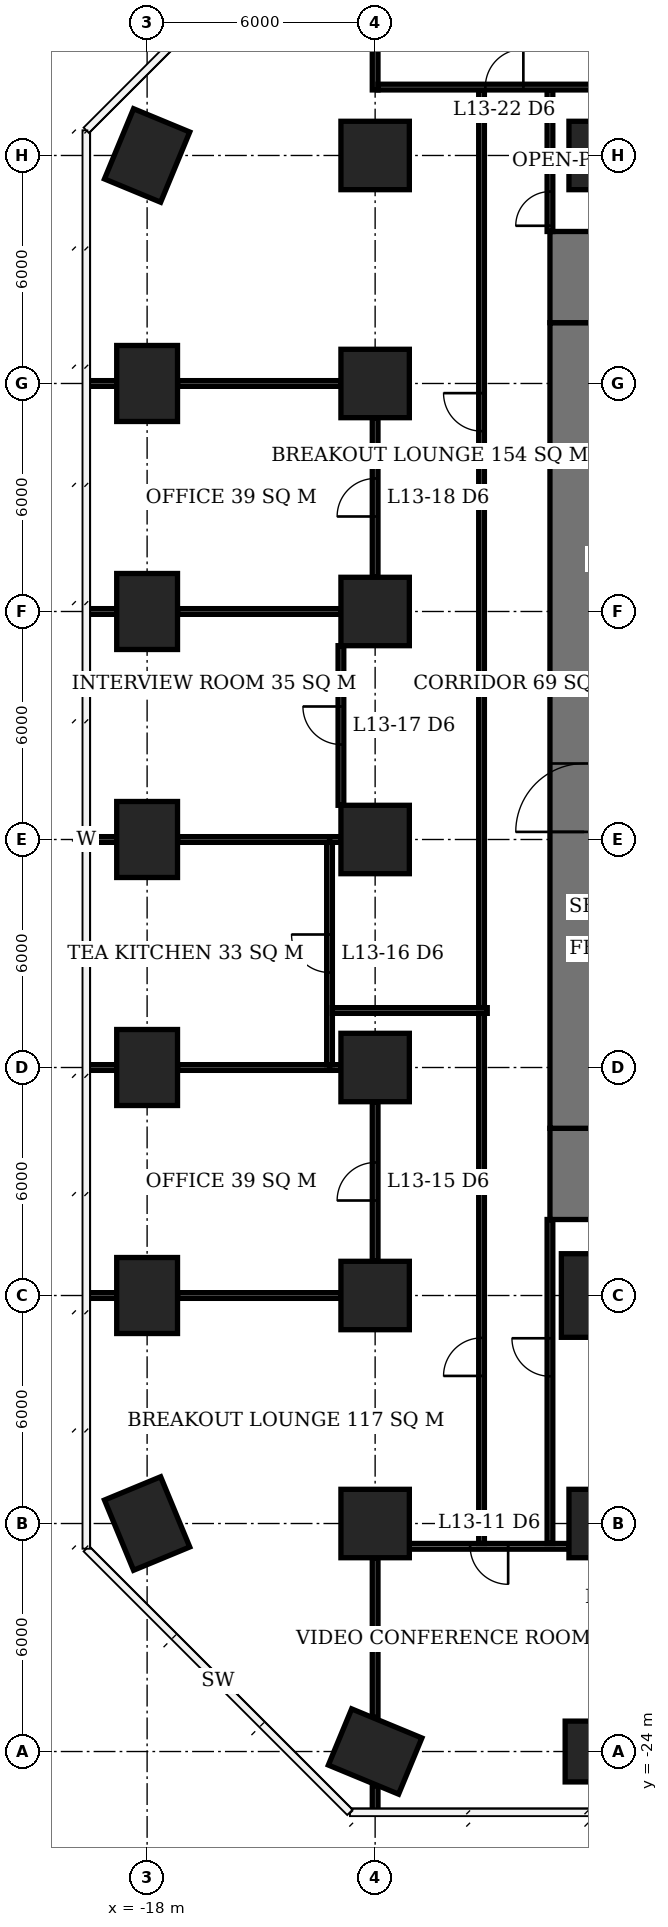
"""IFC4 building model, lengths in metres.
Left out: names, types, materials, properties, quantities, classifications, styles, units other than length and angle.
Written with IfcOpenShell. Run it as: python <this file> out.ifc"""

import sys

from ifc_helpers import new_model, si_unit, direction, frame, frame_2d, origin, origin_2d, place, context, subcontext, project, spatial, rectangle, extrude, element, fill, save


model = new_model("IFC4")
c1 = context("Model", 3, precision=1e-05, world=origin(), true_north=direction((0.0, 1.0)))
c2 = subcontext(c1, "Body", "Model", "MODEL_VIEW")
j1 = project(units=[si_unit("LENGTHUNIT", "METRE"), si_unit("PLANEANGLEUNIT", "RADIAN")], contexts=[c1])
p1 = place(None, origin())
s1 = spatial("IfcSite", under=j1, at=p1, CompositionType="ELEMENT")
p2 = place(p1, origin())
s2 = spatial("IfcBuilding", under=s1, at=p2, CompositionType="ELEMENT")
p3 = place(p2, frame((0.0, 0.0, 57.2)))
s3 = spatial("IfcBuildingStorey", under=s2, at=p3, CompositionType="ELEMENT", Elevation=57.2)
for number, where, z_axis, x_axis in (
    (1, (-18.0, -18.0, 0.0), (0.0, 0.0, 1.0), (-0.383, 0.924, 0.0)),
    (2, (-18.0, -12.0, 0.0), (0.0, 0.0, 1.0), (0.0, 1.0, 0.0)),
    (3, (-18.0, -6.0, 0.0), (0.0, 0.0, 1.0), (0.0, 1.0, 0.0)),
    (4, (-18.0, 0.0, 0.0), (0.0, 0.0, 1.0), (0.0, 1.0, 0.0)),
    (5, (-18.0, 6.0, 0.0), (0.0, 0.0, 1.0), (0.0, 1.0, 0.0)),
    (6, (-18.0, 12.0, 0.0), (0.0, 0.0, 1.0), (0.0, 1.0, 0.0)),
    (7, (-18.0, 18.0, 0.0), (0.0, 0.0, 1.0), (0.383, 0.924, 0.0)),
    (8, (-12.0, -24.0, 0.0), (0.0, 0.0, 1.0), (-0.924, 0.383, 0.0)),
):
    element("IfcColumn", number, at=place(p3, frame(where, z_axis=z_axis, x_axis=x_axis)), inside=s3, PredefinedType="COLUMN", context=c2, shape_type="SweptSolid", body=[
        extrude(rectangle(XDim=2.0, YDim=1.6, at=origin_2d()), origin(), (0.0, 0.0, 1.0), 3.9),
    ])
for number, where, z_axis, x_axis in (
    (9, (-12.0, -18.0, 0.0), (0.0, 0.0, 1.0), (1.0, 0.0, 0.0)),
    (10, (-12.0, -12.0, 0.0), (0.0, 0.0, 1.0), (1.0, 0.0, 0.0)),
    (11, (-12.0, -6.0, 0.0), (0.0, 0.0, 1.0), (1.0, 0.0, 0.0)),
    (12, (-12.0, 0.0, 0.0), (0.0, 0.0, 1.0), (1.0, 0.0, 0.0)),
    (13, (-12.0, 6.0, 0.0), (0.0, 0.0, 1.0), (1.0, 0.0, 0.0)),
    (14, (-12.0, 12.0, 0.0), (0.0, 0.0, 1.0), (1.0, 0.0, 0.0)),
    (15, (-12.0, 18.0, 0.0), (0.0, 0.0, 1.0), (1.0, 0.0, 0.0)),
):
    element("IfcColumn", number, at=place(p3, frame(where, z_axis=z_axis, x_axis=x_axis)), inside=s3, PredefinedType="COLUMN", context=c2, shape_type="SweptSolid", body=[
        extrude(rectangle(XDim=1.8, YDim=1.8, at=origin_2d()), origin(), (0.0, 0.0, 1.0), 3.9),
    ])
p4 = place(p3, frame((-6.0, -24.0, 0.0), z_axis=(0.0, 0.0, 1.0), x_axis=(1.0, 0.0, 0.0)))
e16 = element("IfcColumn", 16, at=p4, inside=s3, PredefinedType="COLUMN", context=c2, shape_type="SweptSolid", body=[
    extrude(rectangle(XDim=2.0, YDim=1.6, at=origin_2d()), origin(), (0.0, 0.0, 1.0), 3.9),
])
p5 = place(p3, frame((-6.0, -18.0, 0.0), z_axis=(0.0, 0.0, 1.0), x_axis=(1.0, 0.0, 0.0)))
e17 = element("IfcColumn", 17, at=p5, inside=s3, PredefinedType="COLUMN", context=c2, shape_type="SweptSolid", body=[
    extrude(rectangle(XDim=1.8, YDim=1.8, at=origin_2d()), origin(), (0.0, 0.0, 1.0), 3.9),
])
p6 = place(p3, frame((-6.0, -12.0, 0.0), z_axis=(0.0, 0.0, 1.0), x_axis=(1.0, 0.0, 0.0)))
e18 = element("IfcColumn", 18, at=p6, inside=s3, PredefinedType="COLUMN", context=c2, shape_type="SweptSolid", body=[
    extrude(rectangle(XDim=2.2, YDim=2.2, at=origin_2d()), origin(), (0.0, 0.0, 1.0), 3.9),
])
p7 = place(p3, frame((-6.0, 18.0, 0.0), z_axis=(0.0, 0.0, 1.0), x_axis=(1.0, 0.0, 0.0)))
e19 = element("IfcColumn", 19, at=p7, inside=s3, PredefinedType="COLUMN", context=c2, shape_type="SweptSolid", body=[
    extrude(rectangle(XDim=1.8, YDim=1.8, at=origin_2d()), origin(), (0.0, 0.0, 1.0), 3.9),
])
p8 = place(p3, frame((-6.5, -7.6, 0.0), z_axis=(0.0, 0.0, 1.0), x_axis=(0.0, 1.0, 0.0)))
e20 = element("IfcWall", 20, at=p8, inside=s3, PredefinedType="SHEAR", context=c2, shape_type="SweptSolid", body=[
    extrude(rectangle(XDim=21.2, YDim=1.8, at=frame_2d((10.6, 0.0))), origin(), (0.0, 0.0, 1.0), 3.9),
])
p9 = place(p8, frame((7.8, 0.0, 0.0)))
e21 = element("IfcOpeningElement", 21, at=p9, cuts=e20, PredefinedType="OPENING", context=c2, shape_type="SweptSolid", body=[
    extrude(rectangle(XDim=1.8, YDim=2.4, at=frame_2d((0.9, 1.2))), frame((0.0, 0.91, 0.0), z_axis=(0.0, -1.0, 0.0), x_axis=(1.0, 0.0, 0.0)), (0.0, 0.0, 1.0), 1.82),
])
for number, where, z_axis, x_axis in (
    (22, (-6.5, -10.0, 0.0), (0.0, 0.0, 1.0), (0.0, 1.0, 0.0)),
    (23, (-6.5, 13.6, 0.0), (0.0, 0.0, 1.0), (0.0, 1.0, 0.0)),
):
    element("IfcWall", number, at=place(p3, frame(where, z_axis=z_axis, x_axis=x_axis)), inside=s3, PredefinedType="SHEAR", context=c2, shape_type="SweptSolid", body=[
        extrude(rectangle(XDim=2.4, YDim=1.8, at=frame_2d((1.2, 0.0))), origin(), (0.0, 0.0, 1.0), 3.9),
    ])
p10 = place(p3, frame((-6.9, -18.6, 0.0), z_axis=(0.0, 0.0, 1.0), x_axis=(-1.0, 0.0, 0.0)))
e24 = element("IfcWall", 24, at=p10, inside=s3, PredefinedType="PARTITIONING", context=c2, shape_type="SweptSolid", body=[
    extrude(rectangle(XDim=4.2, YDim=0.15, at=frame_2d((2.1, 0.0))), origin(), (0.0, 0.0, 1.0), 3.65),
])
p11 = place(p10, frame((1.6, 0.0, 0.0)))
e25 = element("IfcOpeningElement", 25, at=p11, cuts=e24, PredefinedType="OPENING", context=c2, shape_type="SweptSolid", body=[
    extrude(rectangle(XDim=1.0, YDim=2.1, at=frame_2d((0.5, 1.05))), frame((0.0, 0.085, 0.0), z_axis=(0.0, -1.0, 0.0), x_axis=(1.0, 0.0, 0.0)), (0.0, 0.0, 1.0), 0.17),
])
p12 = place(p3, frame((-19.6, -12.0, 0.0), z_axis=(0.0, 0.0, 1.0), x_axis=(1.0, 0.0, 0.0)))
e26 = element("IfcWall", 26, at=p12, inside=s3, PredefinedType="PARTITIONING", context=c2, shape_type="SweptSolid", body=[
    extrude(rectangle(XDim=0.8, YDim=0.15, at=frame_2d((0.4, 0.0))), origin(), (0.0, 0.0, 1.0), 3.65),
])
p13 = place(p3, frame((-17.2, -12.0, 0.0), z_axis=(0.0, 0.0, 1.0), x_axis=(1.0, 0.0, 0.0)))
e27 = element("IfcWall", 27, at=p13, inside=s3, PredefinedType="PARTITIONING", context=c2, shape_type="SweptSolid", body=[
    extrude(rectangle(XDim=4.3, YDim=0.15, at=frame_2d((2.15, 0.0))), origin(), (0.0, 0.0, 1.0), 3.65),
])
p14 = place(p3, frame((-19.6, -6.0, 0.0), z_axis=(0.0, 0.0, 1.0), x_axis=(1.0, 0.0, 0.0)))
e28 = element("IfcWall", 28, at=p14, inside=s3, PredefinedType="PARTITIONING", context=c2, shape_type="SweptSolid", body=[
    extrude(rectangle(XDim=0.8, YDim=0.15, at=frame_2d((0.4, 0.0))), origin(), (0.0, 0.0, 1.0), 3.65),
])
p15 = place(p3, frame((-17.2, -6.0, 0.0), z_axis=(0.0, 0.0, 1.0), x_axis=(1.0, 0.0, 0.0)))
e29 = element("IfcWall", 29, at=p15, inside=s3, PredefinedType="PARTITIONING", context=c2, shape_type="SweptSolid", body=[
    extrude(rectangle(XDim=4.075, YDim=0.15, at=frame_2d((2.038, 0.0))), origin(), (0.0, 0.0, 1.0), 3.65),
])
p16 = place(p3, frame((-13.2, -6.0, 0.0), z_axis=(0.0, 0.0, 1.0), x_axis=(1.0, 0.0, 0.0)))
e30 = element("IfcWall", 30, at=p16, inside=s3, PredefinedType="PARTITIONING", context=c2, shape_type="SweptSolid", body=[
    extrude(rectangle(XDim=0.3, YDim=0.15, at=frame_2d((0.15, 0.0))), origin(), (0.0, 0.0, 1.0), 3.65),
])
p17 = place(p3, frame((-19.55, 0.0, 0.0), z_axis=(0.0, 0.0, 1.0), x_axis=(1.0, 0.0, 0.0)))
e31 = element("IfcWall", 31, at=p17, inside=s3, PredefinedType="PARTITIONING", context=c2, shape_type="SweptSolid", body=[
    extrude(rectangle(XDim=0.75, YDim=0.15, at=frame_2d((0.375, 0.0))), origin(), (0.0, 0.0, 1.0), 3.65),
])
p18 = place(p3, frame((-17.2, 0.0, 0.0), z_axis=(0.0, 0.0, 1.0), x_axis=(1.0, 0.0, 0.0)))
e32 = element("IfcWall", 32, at=p18, inside=s3, PredefinedType="PARTITIONING", context=c2, shape_type="SweptSolid", body=[
    extrude(rectangle(XDim=4.075, YDim=0.15, at=frame_2d((2.038, 0.0))), origin(), (0.0, 0.0, 1.0), 3.65),
])
p19 = place(p3, frame((-13.2, 0.0, 0.0), z_axis=(0.0, 0.0, 1.0), x_axis=(1.0, 0.0, 0.0)))
e33 = element("IfcWall", 33, at=p19, inside=s3, PredefinedType="PARTITIONING", context=c2, shape_type="SweptSolid", body=[
    extrude(rectangle(XDim=0.3, YDim=0.15, at=frame_2d((0.15, 0.0))), origin(), (0.0, 0.0, 1.0), 3.65),
])
p20 = place(p3, frame((-19.6, 6.0, 0.0), z_axis=(0.0, 0.0, 1.0), x_axis=(1.0, 0.0, 0.0)))
e34 = element("IfcWall", 34, at=p20, inside=s3, PredefinedType="PARTITIONING", context=c2, shape_type="SweptSolid", body=[
    extrude(rectangle(XDim=0.8, YDim=0.15, at=frame_2d((0.4, 0.0))), origin(), (0.0, 0.0, 1.0), 3.65),
])
p21 = place(p3, frame((-17.2, 6.0, 0.0), z_axis=(0.0, 0.0, 1.0), x_axis=(1.0, 0.0, 0.0)))
e35 = element("IfcWall", 35, at=p21, inside=s3, PredefinedType="PARTITIONING", context=c2, shape_type="SweptSolid", body=[
    extrude(rectangle(XDim=4.3, YDim=0.15, at=frame_2d((2.15, 0.0))), origin(), (0.0, 0.0, 1.0), 3.65),
])
p22 = place(p3, frame((-19.6, 12.0, 0.0), z_axis=(0.0, 0.0, 1.0), x_axis=(1.0, 0.0, 0.0)))
e36 = element("IfcWall", 36, at=p22, inside=s3, PredefinedType="PARTITIONING", context=c2, shape_type="SweptSolid", body=[
    extrude(rectangle(XDim=0.8, YDim=0.15, at=frame_2d((0.4, 0.0))), origin(), (0.0, 0.0, 1.0), 3.65),
])
p23 = place(p3, frame((-17.2, 12.0, 0.0), z_axis=(0.0, 0.0, 1.0), x_axis=(1.0, 0.0, 0.0)))
e37 = element("IfcWall", 37, at=p23, inside=s3, PredefinedType="PARTITIONING", context=c2, shape_type="SweptSolid", body=[
    extrude(rectangle(XDim=4.3, YDim=0.15, at=frame_2d((2.15, 0.0))), origin(), (0.0, 0.0, 1.0), 3.65),
])
p24 = place(p3, frame((-11.925, 19.8, 0.0), z_axis=(0.0, 0.0, 1.0), x_axis=(1.0, 0.0, 0.0)))
e38 = element("IfcWall", 38, at=p24, inside=s3, PredefinedType="PARTITIONING", context=c2, shape_type="SweptSolid", body=[
    extrude(rectangle(XDim=5.85, YDim=0.15, at=frame_2d((2.925, 0.0))), origin(), (0.0, 0.0, 1.0), 3.65),
])
p25 = place(p24, frame((2.825, 0.0, 0.0)))
e39 = element("IfcOpeningElement", 39, at=p25, cuts=e38, PredefinedType="OPENING", context=c2, shape_type="SweptSolid", body=[
    extrude(rectangle(XDim=1.0, YDim=2.1, at=frame_2d((0.5, 1.05))), frame((0.0, 0.085, 0.0), z_axis=(0.0, -1.0, 0.0), x_axis=(1.0, 0.0, 0.0)), (0.0, 0.0, 1.0), 0.17),
])
p26 = place(p3, frame((-13.2, -5.925, 0.0), z_axis=(0.0, 0.0, 1.0), x_axis=(0.0, 1.0, 0.0)))
e40 = element("IfcWall", 40, at=p26, inside=s3, PredefinedType="PARTITIONING", context=c2, shape_type="SweptSolid", body=[
    extrude(rectangle(XDim=5.85, YDim=0.15, at=frame_2d((2.925, 0.0))), origin(), (0.0, 0.0, 1.0), 3.65),
])
p27 = place(p26, frame((2.425, 0.0, 0.0)))
e41 = element("IfcOpeningElement", 41, at=p27, cuts=e40, PredefinedType="OPENING", context=c2, shape_type="SweptSolid", body=[
    extrude(rectangle(XDim=1.0, YDim=2.1, at=frame_2d((0.5, 1.05))), frame((0.0, 0.085, 0.0), z_axis=(0.0, -1.0, 0.0), x_axis=(1.0, 0.0, 0.0)), (0.0, 0.0, 1.0), 0.17),
])
p28 = place(p3, frame((-12.9, 0.9, 0.0), z_axis=(0.0, 0.0, 1.0), x_axis=(0.0, 1.0, 0.0)))
e42 = element("IfcWall", 42, at=p28, inside=s3, PredefinedType="PARTITIONING", context=c2, shape_type="SweptSolid", body=[
    extrude(rectangle(XDim=4.2, YDim=0.15, at=frame_2d((2.1, 0.0))), origin(), (0.0, 0.0, 1.0), 3.65),
])
p29 = place(p28, frame((1.6, 0.0, 0.0)))
e43 = element("IfcOpeningElement", 43, at=p29, cuts=e42, PredefinedType="OPENING", context=c2, shape_type="SweptSolid", body=[
    extrude(rectangle(XDim=1.0, YDim=2.1, at=frame_2d((0.5, 1.05))), frame((0.0, 0.085, 0.0), z_axis=(0.0, -1.0, 0.0), x_axis=(1.0, 0.0, 0.0)), (0.0, 0.0, 1.0), 0.17),
])
p30 = place(p3, frame((-12.0, -25.6, 0.0), z_axis=(0.0, 0.0, 1.0), x_axis=(0.0, 1.0, 0.0)))
e44 = element("IfcWall", 44, at=p30, inside=s3, PredefinedType="PARTITIONING", context=c2, shape_type="SweptSolid", body=[
    extrude(rectangle(XDim=0.703, YDim=0.15, at=frame_2d((0.352, 0.0))), origin(), (0.0, 0.0, 1.0), 3.65),
])
p31 = place(p3, frame((-12.0, -23.103, 0.0), z_axis=(0.0, 0.0, 1.0), x_axis=(0.0, 1.0, 0.0)))
e45 = element("IfcWall", 45, at=p31, inside=s3, PredefinedType="PARTITIONING", context=c2, shape_type="SweptSolid", body=[
    extrude(rectangle(XDim=4.203, YDim=0.15, at=frame_2d((2.102, 0.0))), origin(), (0.0, 0.0, 1.0), 3.65),
])
p32 = place(p3, frame((-12.0, -11.1, 0.0), z_axis=(0.0, 0.0, 1.0), x_axis=(0.0, 1.0, 0.0)))
e46 = element("IfcWall", 46, at=p32, inside=s3, PredefinedType="PARTITIONING", context=c2, shape_type="SweptSolid", body=[
    extrude(rectangle(XDim=4.2, YDim=0.15, at=frame_2d((2.1, 0.0))), origin(), (0.0, 0.0, 1.0), 3.65),
])
p33 = place(p32, frame((1.6, 0.0, 0.0)))
e47 = element("IfcOpeningElement", 47, at=p33, cuts=e46, PredefinedType="OPENING", context=c2, shape_type="SweptSolid", body=[
    extrude(rectangle(XDim=1.0, YDim=2.1, at=frame_2d((0.5, 1.05))), frame((0.0, 0.085, 0.0), z_axis=(0.0, -1.0, 0.0), x_axis=(1.0, 0.0, 0.0)), (0.0, 0.0, 1.0), 0.17),
])
p34 = place(p3, frame((-12.0, 6.9, 0.0), z_axis=(0.0, 0.0, 1.0), x_axis=(0.0, 1.0, 0.0)))
e48 = element("IfcWall", 48, at=p34, inside=s3, PredefinedType="PARTITIONING", context=c2, shape_type="SweptSolid", body=[
    extrude(rectangle(XDim=4.2, YDim=0.15, at=frame_2d((2.1, 0.0))), origin(), (0.0, 0.0, 1.0), 3.65),
])
p35 = place(p34, frame((1.6, 0.0, 0.0)))
e49 = element("IfcOpeningElement", 49, at=p35, cuts=e48, PredefinedType="OPENING", context=c2, shape_type="SweptSolid", body=[
    extrude(rectangle(XDim=1.0, YDim=2.1, at=frame_2d((0.5, 1.05))), frame((0.0, 0.085, 0.0), z_axis=(0.0, -1.0, 0.0), x_axis=(1.0, 0.0, 0.0)), (0.0, 0.0, 1.0), 0.17),
])
p36 = place(p3, frame((-12.0, 19.725, 0.0), z_axis=(0.0, 0.0, 1.0), x_axis=(0.0, 1.0, 0.0)))
e50 = element("IfcWall", 50, at=p36, inside=s3, PredefinedType="PARTITIONING", context=c2, shape_type="SweptSolid", body=[
    extrude(rectangle(XDim=3.27, YDim=0.15, at=frame_2d((1.635, 0.0))), origin(), (0.0, 0.0, 1.0), 3.65),
])
p37 = place(p3, frame((-13.125, -4.5, 0.0), z_axis=(0.0, 0.0, 1.0), x_axis=(1.0, 0.0, 0.0)))
e51 = element("IfcWall", 51, at=p37, inside=s3, PredefinedType="PARTITIONING", context=c2, shape_type="SweptSolid", body=[
    extrude(rectangle(XDim=4.075, YDim=0.15, at=frame_2d((2.038, 0.0))), origin(), (0.0, 0.0, 1.0), 3.65),
])
p38 = place(p3, frame((-9.2, -18.525, 0.0), z_axis=(0.0, 0.0, 1.0), x_axis=(0.0, 1.0, 0.0)))
e52 = element("IfcWall", 52, at=p38, inside=s3, PredefinedType="PARTITIONING", context=c2, shape_type="SweptSolid", body=[
    extrude(rectangle(XDim=13.95, YDim=0.15, at=frame_2d((6.975, 0.0))), origin(), (0.0, 0.0, 1.0), 3.65),
])
p39 = place(p38, frame((4.409, 0.0, 0.0)))
e53 = element("IfcOpeningElement", 53, at=p39, cuts=e52, PredefinedType="OPENING", context=c2, shape_type="SweptSolid", body=[
    extrude(rectangle(XDim=1.0, YDim=2.1, at=frame_2d((0.5, 1.05))), frame((0.0, 0.085, 0.0), z_axis=(0.0, -1.0, 0.0), x_axis=(1.0, 0.0, 0.0)), (0.0, 0.0, 1.0), 0.17),
])
p40 = place(p3, frame((-9.2, -4.425, 0.0), z_axis=(0.0, 0.0, 1.0), x_axis=(0.0, 1.0, 0.0)))
e54 = element("IfcWall", 54, at=p40, inside=s3, PredefinedType="PARTITIONING", context=c2, shape_type="SweptSolid", body=[
    extrude(rectangle(XDim=24.15, YDim=0.15, at=frame_2d((12.075, 0.0))), origin(), (0.0, 0.0, 1.0), 3.65),
])
p41 = place(p40, frame((15.171, 0.0, 0.0)))
e55 = element("IfcOpeningElement", 55, at=p41, cuts=e54, PredefinedType="OPENING", context=c2, shape_type="SweptSolid", body=[
    extrude(rectangle(XDim=1.0, YDim=2.1, at=frame_2d((0.5, 1.05))), frame((0.0, 0.085, 0.0), z_axis=(0.0, -1.0, 0.0), x_axis=(1.0, 0.0, 0.0)), (0.0, 0.0, 1.0), 0.17),
])
p42 = place(p3, frame((-7.4, -18.525, 0.0), z_axis=(0.0, 0.0, 1.0), x_axis=(0.0, 1.0, 0.0)))
e56 = element("IfcWall", 56, at=p42, inside=s3, PredefinedType="PARTITIONING", context=c2, shape_type="SweptSolid", body=[
    extrude(rectangle(XDim=8.525, YDim=0.15, at=frame_2d((4.262, 0.0))), origin(), (0.0, 0.0, 1.0), 3.65),
])
p43 = place(p42, frame((4.4, 0.0, 0.0)))
e57 = element("IfcOpeningElement", 57, at=p43, cuts=e56, PredefinedType="OPENING", context=c2, shape_type="SweptSolid", body=[
    extrude(rectangle(XDim=1.0, YDim=2.1, at=frame_2d((0.5, 1.05))), frame((0.0, 0.085, 0.0), z_axis=(0.0, -1.0, 0.0), x_axis=(1.0, 0.0, 0.0)), (0.0, 0.0, 1.0), 0.17),
])
p44 = place(p3, frame((-7.4, 16.0, 0.0), z_axis=(0.0, 0.0, 1.0), x_axis=(0.0, 1.0, 0.0)))
e58 = element("IfcWall", 58, at=p44, inside=s3, PredefinedType="PARTITIONING", context=c2, shape_type="SweptSolid", body=[
    extrude(rectangle(XDim=3.725, YDim=0.15, at=frame_2d((1.863, 0.0))), origin(), (0.0, 0.0, 1.0), 3.65),
])
p45 = place(p44, frame((0.15, 0.0, 0.0)))
e59 = element("IfcOpeningElement", 59, at=p45, cuts=e58, PredefinedType="OPENING", context=c2, shape_type="SweptSolid", body=[
    extrude(rectangle(XDim=0.9, YDim=2.1, at=frame_2d((0.45, 1.05))), frame((0.0, 0.085, 0.0), z_axis=(0.0, -1.0, 0.0), x_axis=(1.0, 0.0, 0.0)), (0.0, 0.0, 1.0), 0.17),
])
p46 = place(p9, origin())
e60 = element("IfcDoor", 60, at=p46, inside=s3, OperationType="DOUBLE_DOOR_SINGLE_SWING", PredefinedType="DOOR", context=c2, shape_type="SweptSolid", body=[
    extrude(rectangle(XDim=1.8, YDim=2.4, at=frame_2d((0.9, 1.2))), frame((0.0, 0.025, 0.0), z_axis=(0.0, -1.0, 0.0), x_axis=(1.0, 0.0, 0.0)), (0.0, 0.0, 1.0), 0.05),
])
fill(e21, e60)
p47 = place(p11, origin())
e61 = element("IfcDoor", 61, at=p47, inside=s3, OperationType="SINGLE_SWING_LEFT", PredefinedType="DOOR", context=c2, shape_type="SweptSolid", body=[
    extrude(rectangle(XDim=1.0, YDim=2.1, at=frame_2d((0.5, 1.05))), frame((0.0, 0.025, 0.0), z_axis=(0.0, -1.0, 0.0), x_axis=(1.0, 0.0, 0.0)), (0.0, 0.0, 1.0), 0.05),
])
fill(e25, e61)
p48 = place(p33, origin())
e62 = element("IfcDoor", 62, at=p48, inside=s3, OperationType="SINGLE_SWING_LEFT", PredefinedType="DOOR", context=c2, shape_type="SweptSolid", body=[
    extrude(rectangle(XDim=1.0, YDim=2.1, at=frame_2d((0.5, 1.05))), frame((0.0, 0.025, 0.0), z_axis=(0.0, -1.0, 0.0), x_axis=(1.0, 0.0, 0.0)), (0.0, 0.0, 1.0), 0.05),
])
fill(e47, e62)
p49 = place(p27, origin())
e63 = element("IfcDoor", 63, at=p49, inside=s3, OperationType="SINGLE_SWING_RIGHT", PredefinedType="DOOR", context=c2, shape_type="SweptSolid", body=[
    extrude(rectangle(XDim=1.0, YDim=2.1, at=frame_2d((0.5, 1.05))), frame((0.0, 0.025, 0.0), z_axis=(0.0, -1.0, 0.0), x_axis=(1.0, 0.0, 0.0)), (0.0, 0.0, 1.0), 0.05),
])
fill(e41, e63)
p50 = place(p29, origin())
e64 = element("IfcDoor", 64, at=p50, inside=s3, OperationType="SINGLE_SWING_RIGHT", PredefinedType="DOOR", context=c2, shape_type="SweptSolid", body=[
    extrude(rectangle(XDim=1.0, YDim=2.1, at=frame_2d((0.5, 1.05))), frame((0.0, 0.025, 0.0), z_axis=(0.0, -1.0, 0.0), x_axis=(1.0, 0.0, 0.0)), (0.0, 0.0, 1.0), 0.05),
])
fill(e43, e64)
p51 = place(p35, origin())
e65 = element("IfcDoor", 65, at=p51, inside=s3, OperationType="SINGLE_SWING_LEFT", PredefinedType="DOOR", context=c2, shape_type="SweptSolid", body=[
    extrude(rectangle(XDim=1.0, YDim=2.1, at=frame_2d((0.5, 1.05))), frame((0.0, 0.025, 0.0), z_axis=(0.0, -1.0, 0.0), x_axis=(1.0, 0.0, 0.0)), (0.0, 0.0, 1.0), 0.05),
])
fill(e49, e65)
p52 = place(p25, origin())
e66 = element("IfcDoor", 66, at=p52, inside=s3, OperationType="SINGLE_SWING_RIGHT", PredefinedType="DOOR", context=c2, shape_type="SweptSolid", body=[
    extrude(rectangle(XDim=1.0, YDim=2.1, at=frame_2d((0.5, 1.05))), frame((0.0, 0.025, 0.0), z_axis=(0.0, -1.0, 0.0), x_axis=(1.0, 0.0, 0.0)), (0.0, 0.0, 1.0), 0.05),
])
fill(e39, e66)
p53 = place(p39, origin())
e67 = element("IfcDoor", 67, at=p53, inside=s3, OperationType="SINGLE_SWING_LEFT", PredefinedType="DOOR", context=c2, shape_type="SweptSolid", body=[
    extrude(rectangle(XDim=1.0, YDim=2.1, at=frame_2d((0.5, 1.05))), frame((0.0, 0.025, 0.0), z_axis=(0.0, -1.0, 0.0), x_axis=(1.0, 0.0, 0.0)), (0.0, 0.0, 1.0), 0.05),
])
fill(e53, e67)
p54 = place(p41, origin())
e68 = element("IfcDoor", 68, at=p54, inside=s3, OperationType="SINGLE_SWING_RIGHT", PredefinedType="DOOR", context=c2, shape_type="SweptSolid", body=[
    extrude(rectangle(XDim=1.0, YDim=2.1, at=frame_2d((0.5, 1.05))), frame((0.0, 0.025, 0.0), z_axis=(0.0, -1.0, 0.0), x_axis=(1.0, 0.0, 0.0)), (0.0, 0.0, 1.0), 0.05),
])
fill(e55, e68)
p55 = place(p43, origin())
e69 = element("IfcDoor", 69, at=p55, inside=s3, OperationType="SINGLE_SWING_RIGHT", PredefinedType="DOOR", context=c2, shape_type="SweptSolid", body=[
    extrude(rectangle(XDim=1.0, YDim=2.1, at=frame_2d((0.5, 1.05))), frame((0.0, 0.025, 0.0), z_axis=(0.0, -1.0, 0.0), x_axis=(1.0, 0.0, 0.0)), (0.0, 0.0, 1.0), 0.05),
])
fill(e57, e69)
p56 = place(p45, origin())
e70 = element("IfcDoor", 70, at=p56, inside=s3, OperationType="SINGLE_SWING_LEFT", PredefinedType="DOOR", context=c2, shape_type="SweptSolid", body=[
    extrude(rectangle(XDim=0.9, YDim=2.1, at=frame_2d((0.45, 1.05))), frame((0.0, 0.025, 0.0), z_axis=(0.0, -1.0, 0.0), x_axis=(1.0, 0.0, 0.0)), (0.0, 0.0, 1.0), 0.05),
])
fill(e59, e70)
save(model, sys.argv[1])
